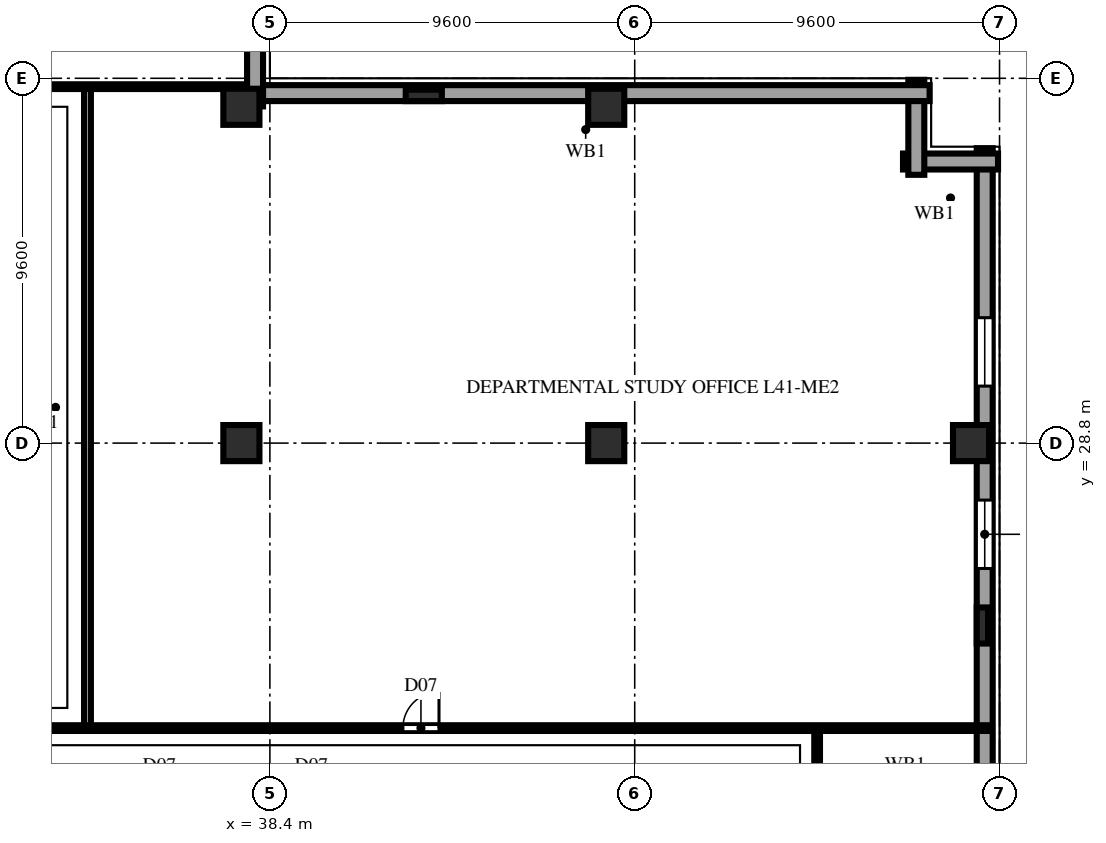
"""IFC4 building model, lengths in metres.
Left out: names, types, materials, properties, quantities, classifications, styles, units other than length and angle.
Written with IfcOpenShell. Run it as: python <this file> out.ifc"""

import sys

from ifc_helpers import new_model, si_unit, direction, frame, frame_2d, origin, origin_2d, place, context, subcontext, project, spatial, rectangle, extrude, element, fill, save


model = new_model("IFC4")
c1 = context("Model", 3, precision=1e-05, world=origin(), true_north=direction((0.0, 1.0)))
c2 = subcontext(c1, "Body", "Model", "MODEL_VIEW")
j1 = project(units=[si_unit("LENGTHUNIT", "METRE"), si_unit("PLANEANGLEUNIT", "RADIAN")], contexts=[c1])
p1 = place(None, origin())
s1 = spatial("IfcSite", under=j1, at=p1, CompositionType="ELEMENT")
p2 = place(p1, origin())
s2 = spatial("IfcBuilding", under=s1, at=p2, CompositionType="ELEMENT")
p3 = place(p2, frame((0.0, 0.0, 163.6)))
s3 = spatial("IfcBuildingStorey", under=s2, at=p3, CompositionType="ELEMENT", Elevation=163.6)
for number, where, z_axis, x_axis in (
    (1, (37.65, 28.8, 0.0), (0.0, 0.0, 1.0), (1.0, 0.0, 0.0)),
    (2, (37.65, 37.65, 0.0), (0.0, 0.0, 1.0), (1.0, 0.0, 0.0)),
    (3, (47.25, 28.8, 0.0), (0.0, 0.0, 1.0), (1.0, 0.0, 0.0)),
    (4, (47.25, 37.65, 0.0), (0.0, 0.0, 1.0), (1.0, 0.0, 0.0)),
    (5, (56.85, 28.8, 0.0), (0.0, 0.0, 1.0), (1.0, 0.0, 0.0)),
):
    element("IfcColumn", number, at=place(p3, frame(where, z_axis=z_axis, x_axis=x_axis)), inside=s3, PredefinedType="COLUMN", context=c2, shape_type="SweptSolid", body=[
        extrude(rectangle(XDim=0.95, YDim=0.95, at=origin_2d()), origin(), (0.0, 0.0, 1.0), 3.8),
    ])
for number, where, z_axis, x_axis in (
    (6, (57.15, 24.0, 0.0), (0.0, 0.0, 1.0), (0.0, 1.0, 0.0)),
    (7, (42.45, 37.95, 0.0), (0.0, 0.0, 1.0), (1.0, 0.0, 0.0)),
):
    element("IfcColumn", number, at=place(p3, frame(where, z_axis=z_axis, x_axis=x_axis)), inside=s3, PredefinedType="PILASTER", context=c2, shape_type="SweptSolid", body=[
        extrude(rectangle(XDim=0.95, YDim=0.3, at=origin_2d()), origin(), (0.0, 0.0, 1.0), 3.8),
    ])
p4 = place(p3, frame((57.21, 1.84, 0.0), z_axis=(0.0, 0.0, 1.0), x_axis=(0.0, 1.0, 0.0)))
e8 = element("IfcWall", 8, at=p4, inside=s3, PredefinedType="SOLIDWALL", context=c2, shape_type="SweptSolid", body=[
    extrude(rectangle(XDim=34.72, YDim=0.42, at=frame_2d((17.36, 0.0))), origin(), (0.0, 0.0, 1.0), 3.54),
])
p5 = place(p4, frame((4.46, 0.0, 0.85)))
e9 = element("IfcOpeningElement", 9, at=p5, cuts=e8, PredefinedType="OPENING", context=c2, shape_type="SweptSolid", body=[
    extrude(rectangle(XDim=1.8, YDim=1.85, at=frame_2d((0.9, 0.925))), frame((0.0, 0.222, 0.0), z_axis=(0.0, -1.0, 0.0), x_axis=(1.0, 0.0, 0.0)), (0.0, 0.0, 1.0), 0.444),
])
p6 = place(p4, frame((9.26, 0.0, 0.85)))
e10 = element("IfcOpeningElement", 10, at=p6, cuts=e8, PredefinedType="OPENING", context=c2, shape_type="SweptSolid", body=[
    extrude(rectangle(XDim=1.8, YDim=1.85, at=frame_2d((0.9, 0.925))), frame((0.0, 0.222, 0.0), z_axis=(0.0, -1.0, 0.0), x_axis=(1.0, 0.0, 0.0)), (0.0, 0.0, 1.0), 0.444),
])
p7 = place(p4, frame((14.06, 0.0, 0.85)))
e11 = element("IfcOpeningElement", 11, at=p7, cuts=e8, PredefinedType="OPENING", context=c2, shape_type="SweptSolid", body=[
    extrude(rectangle(XDim=1.8, YDim=1.85, at=frame_2d((0.9, 0.925))), frame((0.0, 0.222, 0.0), z_axis=(0.0, -1.0, 0.0), x_axis=(1.0, 0.0, 0.0)), (0.0, 0.0, 1.0), 0.444),
])
p8 = place(p4, frame((23.66, 0.0, 0.85)))
e12 = element("IfcOpeningElement", 12, at=p8, cuts=e8, PredefinedType="OPENING", context=c2, shape_type="SweptSolid", body=[
    extrude(rectangle(XDim=1.8, YDim=1.85, at=frame_2d((0.9, 0.925))), frame((0.0, 0.222, 0.0), z_axis=(0.0, -1.0, 0.0), x_axis=(1.0, 0.0, 0.0)), (0.0, 0.0, 1.0), 0.444),
])
p9 = place(p4, frame((28.46, 0.0, 0.85)))
e13 = element("IfcOpeningElement", 13, at=p9, cuts=e8, PredefinedType="OPENING", context=c2, shape_type="SweptSolid", body=[
    extrude(rectangle(XDim=1.8, YDim=1.85, at=frame_2d((0.9, 0.925))), frame((0.0, 0.222, 0.0), z_axis=(0.0, -1.0, 0.0), x_axis=(1.0, 0.0, 0.0)), (0.0, 0.0, 1.0), 0.444),
])
for number, where, z_axis, x_axis in (
    (14, (57.56, 36.21, 0.0), (0.0, 0.0, 1.0), (-1.0, 0.0, 0.0)),
    (15, (55.41, 35.86, 0.0), (0.0, 0.0, 1.0), (0.0, 1.0, 0.0)),
):
    element("IfcWall", number, at=place(p3, frame(where, z_axis=z_axis, x_axis=x_axis)), inside=s3, PredefinedType="SOLIDWALL", context=c2, shape_type="SweptSolid", body=[
        extrude(rectangle(XDim=2.5, YDim=0.42, at=frame_2d((1.25, 0.0))), origin(), (0.0, 0.0, 1.0), 3.54),
    ])
p10 = place(p3, frame((55.76, 38.01, 0.0), z_axis=(0.0, 0.0, 1.0), x_axis=(-1.0, 0.0, 0.0)))
e16 = element("IfcWall", 16, at=p10, inside=s3, PredefinedType="SOLIDWALL", context=c2, shape_type="SweptSolid", body=[
    extrude(rectangle(XDim=18.1, YDim=0.42, at=frame_2d((9.05, 0.0))), origin(), (0.0, 0.0, 1.0), 3.54),
])
p11 = place(p3, frame((38.01, 37.66, 0.0), z_axis=(0.0, 0.0, 1.0), x_axis=(0.0, 1.0, 0.0)))
e17 = element("IfcWall", 17, at=p11, inside=s3, PredefinedType="SOLIDWALL", context=c2, shape_type="SweptSolid", body=[
    extrude(rectangle(XDim=27.7, YDim=0.42, at=frame_2d((13.85, 0.0))), origin(), (0.0, 0.0, 1.0), 3.54),
])
p12 = place(p3, frame((52.8, 19.2, 0.0), z_axis=(0.0, 0.0, 1.0), x_axis=(0.0, 1.0, 0.0)))
e18 = element("IfcWall", 18, at=p12, inside=s3, PredefinedType="PARTITIONING", context=c2, shape_type="SweptSolid", body=[
    extrude(rectangle(XDim=2.1, YDim=0.15, at=frame_2d((1.05, 0.0))), origin(), (0.0, 0.0, 1.0), 3.54),
])
p13 = place(p3, frame((33.6, 21.3, 0.0), z_axis=(0.0, 0.0, 1.0), x_axis=(0.0, 1.0, 0.0)))
e19 = element("IfcWall", 19, at=p13, inside=s3, PredefinedType="PARTITIONING", context=c2, shape_type="SweptSolid", body=[
    extrude(rectangle(XDim=16.88, YDim=0.18, at=frame_2d((8.44, 0.0))), origin(), (0.0, 0.0, 1.0), 3.54),
])
p14 = place(p3, frame((19.2, 21.3, 0.0), z_axis=(0.0, 0.0, 1.0), x_axis=(1.0, 0.0, 0.0)))
e20 = element("IfcWall", 20, at=p14, inside=s3, PredefinedType="PARTITIONING", context=c2, shape_type="SweptSolid", body=[
    extrude(rectangle(XDim=38.18, YDim=0.15, at=frame_2d((19.09, 0.0))), origin(), (0.0, 0.0, 1.0), 3.54),
])
p15 = place(p14, frame((4.3, 0.0, 0.0)))
e21 = element("IfcOpeningElement", 21, at=p15, cuts=e20, PredefinedType="OPENING", context=c2, shape_type="SweptSolid", body=[
    extrude(rectangle(XDim=0.95, YDim=2.15, at=frame_2d((0.475, 1.075))), frame((0.0, 0.087, 0.0), z_axis=(0.0, -1.0, 0.0), x_axis=(1.0, 0.0, 0.0)), (0.0, 0.0, 1.0), 0.174),
])
p16 = place(p14, frame((22.7, 0.0, 0.0)))
e22 = element("IfcOpeningElement", 22, at=p16, cuts=e20, PredefinedType="OPENING", context=c2, shape_type="SweptSolid", body=[
    extrude(rectangle(XDim=0.95, YDim=2.15, at=frame_2d((0.475, 1.075))), frame((0.0, 0.087, 0.0), z_axis=(0.0, -1.0, 0.0), x_axis=(1.0, 0.0, 0.0)), (0.0, 0.0, 1.0), 0.174),
])
p17 = place(p3, frame((19.28, 38.18, 0.0), z_axis=(0.0, 0.0, 1.0), x_axis=(1.0, 0.0, 0.0)))
e23 = element("IfcWall", 23, at=p17, inside=s3, PredefinedType="PARTITIONING", context=c2, shape_type="SweptSolid", body=[
    extrude(rectangle(XDim=18.37, YDim=0.125, at=frame_2d((9.185, 0.0))), origin(), (0.0, 0.0, 1.0), 3.54),
])
p18 = place(p8, origin())
e24 = element("IfcWindow", 24, at=p18, inside=s3, PartitioningType="DOUBLE_PANEL_VERTICAL", PredefinedType="WINDOW", context=c2, shape_type="SweptSolid", body=[
    extrude(rectangle(XDim=1.8, YDim=1.85, at=frame_2d((0.9, 0.925))), frame((0.0, 0.11, 0.0), z_axis=(0.0, -1.0, 0.0), x_axis=(1.0, 0.0, 0.0)), (0.0, 0.0, 1.0), 0.06),
])
fill(e12, e24)
p19 = place(p9, origin())
e25 = element("IfcWindow", 25, at=p19, inside=s3, PartitioningType="DOUBLE_PANEL_VERTICAL", PredefinedType="WINDOW", context=c2, shape_type="SweptSolid", body=[
    extrude(rectangle(XDim=1.8, YDim=1.85, at=frame_2d((0.9, 0.925))), frame((0.0, 0.11, 0.0), z_axis=(0.0, -1.0, 0.0), x_axis=(1.0, 0.0, 0.0)), (0.0, 0.0, 1.0), 0.06),
])
fill(e13, e25)
p20 = place(p16, origin())
e26 = element("IfcDoor", 26, at=p20, inside=s3, OperationType="SINGLE_SWING_RIGHT", PredefinedType="DOOR", context=c2, shape_type="SweptSolid", body=[
    extrude(rectangle(XDim=0.95, YDim=2.15, at=frame_2d((0.475, 1.075))), frame((0.0, 0.025, 0.0), z_axis=(0.0, -1.0, 0.0), x_axis=(1.0, 0.0, 0.0)), (0.0, 0.0, 1.0), 0.05),
])
fill(e22, e26)
save(model, sys.argv[1])
